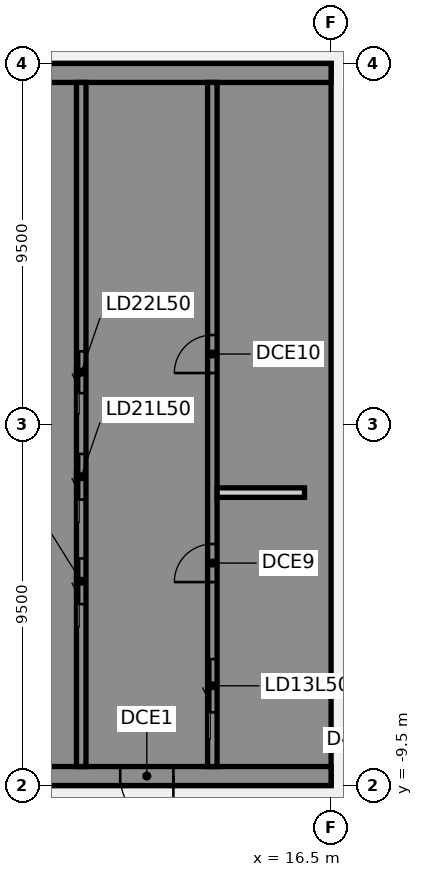
"""IFC4 building model, lengths in metres.
Left out: names, types, materials, properties, quantities, classifications, styles, units other than length and angle.
Written with IfcOpenShell. Run it as: python <this file> out.ifc"""

import sys

from ifc_helpers import new_model, si_unit, direction, frame, frame_2d, origin, place, context, subcontext, project, spatial, polyline, rectangle, outline, extrude, element, fill, save


model = new_model("IFC4")
c1 = context("Model", 3, precision=1e-05, world=origin(), true_north=direction((0.0, 1.0)))
c2 = subcontext(c1, "Body", "Model", "MODEL_VIEW")
j1 = project(units=[si_unit("LENGTHUNIT", "METRE"), si_unit("PLANEANGLEUNIT", "RADIAN")], contexts=[c1])
p1 = place(None, origin())
s1 = spatial("IfcSite", under=j1, at=p1, CompositionType="ELEMENT")
p2 = place(p1, origin())
s2 = spatial("IfcBuilding", under=s1, at=p2, CompositionType="ELEMENT")
p3 = place(p2, frame((0.0, 0.0, 200.5)))
s3 = spatial("IfcBuildingStorey", under=s2, at=p3, CompositionType="ELEMENT", Elevation=200.5)
p4 = place(p3, frame((16.5, -9.25, 0.0), z_axis=(0.0, 0.0, 1.0), x_axis=(-1.0, 0.0, 0.0)))
e1 = element("IfcWall", 1, at=p4, inside=s3, PredefinedType="SHEAR", context=c2, shape_type="SweptSolid", body=[
    extrude(rectangle(XDim=13.0, YDim=0.5, at=frame_2d((6.5, 0.0))), origin(), (0.0, 0.0, 1.0), 3.46),
])
p5 = place(p4, frame((4.15, 0.0, 0.0)))
e2 = element("IfcOpeningElement", 2, at=p5, cuts=e1, PredefinedType="OPENING", context=c2, shape_type="SweptSolid", body=[
    extrude(rectangle(XDim=1.4, YDim=2.1, at=frame_2d((0.7, 1.05))), frame((0.0, 0.26, 0.0), z_axis=(0.0, -1.0, 0.0), x_axis=(1.0, 0.0, 0.0)), (0.0, 0.0, 1.0), 0.52),
])
p6 = place(p4, frame((10.125, 0.0, 0.0)))
e3 = element("IfcOpeningElement", 3, at=p6, cuts=e1, PredefinedType="OPENING", context=c2, shape_type="SweptSolid", body=[
    extrude(rectangle(XDim=1.4, YDim=2.1, at=frame_2d((0.7, 1.05))), frame((0.0, 0.26, 0.0), z_axis=(0.0, -1.0, 0.0), x_axis=(1.0, 0.0, 0.0)), (0.0, 0.0, 1.0), 0.52),
])
p7 = place(p3, origin())
e4 = element("IfcWall", 4, at=p7, inside=s3, PredefinedType="SHEAR", context=c2, shape_type="SweptSolid", body=[
    extrude(outline(polyline([(13.5, -8.125), (13.5, -9.0), (16.0, -9.0), (16.5, -9.0), (16.5, 9.0), (16.0, 9.0), (13.5, 9.0), (13.5, 8.125), (16.0, 8.125), (16.0, 5.625), (13.5, 5.625), (13.5, 5.375), (16.0, 5.375), (16.0, -5.375), (13.5, -5.375), (13.5, -5.625), (16.0, -5.625), (16.0, -8.125), (13.5, -8.125)])), origin(), (0.0, 0.0, 1.0), 3.46),
])
p8 = place(p3, frame((16.5, 9.25, 0.0), z_axis=(0.0, 0.0, 1.0), x_axis=(-1.0, 0.0, 0.0)))
e5 = element("IfcWall", 5, at=p8, inside=s3, PredefinedType="SHEAR", context=c2, shape_type="SweptSolid", body=[
    extrude(rectangle(XDim=13.0, YDim=0.5, at=frame_2d((6.5, 0.0))), origin(), (0.0, 0.0, 1.0), 3.46),
])
p9 = place(p3, origin())
e6 = element("IfcWall", 6, at=p9, inside=s3, PredefinedType="SHEAR", context=c2, shape_type="SweptSolid", body=[
    extrude(outline(polyline([(9.8, -5.375), (7.5, -5.375), (7.5, -2.875), (9.8, -2.875), (9.8, -2.625), (7.5, -2.625), (7.5, -0.125), (9.8, -0.125), (9.8, 0.125), (7.5, 0.125), (7.5, 2.625), (9.8, 2.625), (9.8, 2.875), (7.5, 2.875), (7.5, 5.375), (9.8, 5.375), (9.8, 5.625), (7.5, 5.625), (7.5, 8.125), (9.8, 8.125), (9.8, 9.0), (7.5, 9.0), (7.25, 9.0), (7.25, -5.625), (7.5, -5.625), (9.8, -5.625), (9.8, -5.375)])), origin(), (0.0, 0.0, 1.0), 3.46),
])
p10 = place(p3, origin())
e7 = element("IfcWall", 7, at=p10, inside=s3, PredefinedType="SHEAR", context=c2, shape_type="SweptSolid", body=[
    extrude(outline(polyline([(7.5, -8.125), (7.5, -9.0), (9.8, -9.0), (9.8, -8.125), (9.8, -5.625), (9.55, -5.625), (9.55, -8.125), (7.5, -8.125)])), origin(), (0.0, 0.0, 1.0), 3.46),
])
p11 = place(p3, frame((13.375, -9.0, 0.0), z_axis=(0.0, 0.0, 1.0), x_axis=(0.0, 1.0, 0.0)))
e8 = element("IfcWall", 8, at=p11, inside=s3, PredefinedType="SHEAR", context=c2, shape_type="SweptSolid", body=[
    extrude(rectangle(XDim=18.0, YDim=0.25, at=frame_2d((9.0, 0.0))), origin(), (0.0, 0.0, 1.0), 3.46),
])
p12 = place(p11, frame((1.425, 0.0, 0.0)))
e9 = element("IfcOpeningElement", 9, at=p12, cuts=e8, PredefinedType="OPENING", context=c2, shape_type="SweptSolid", body=[
    extrude(rectangle(XDim=1.4, YDim=2.1, at=frame_2d((0.7, 1.05))), frame((0.0, 0.135, 0.0), z_axis=(0.0, -1.0, 0.0), x_axis=(1.0, 0.0, 0.0)), (0.0, 0.0, 1.0), 0.27),
])
p13 = place(p11, frame((4.854, 0.0, 0.0)))
e10 = element("IfcOpeningElement", 10, at=p13, cuts=e8, PredefinedType="OPENING", context=c2, shape_type="SweptSolid", body=[
    extrude(rectangle(XDim=1.0, YDim=2.1, at=frame_2d((0.5, 1.05))), frame((0.0, 0.135, 0.0), z_axis=(0.0, -1.0, 0.0), x_axis=(1.0, 0.0, 0.0)), (0.0, 0.0, 1.0), 0.27),
])
p14 = place(p11, frame((10.354, 0.0, 0.0)))
e11 = element("IfcOpeningElement", 11, at=p14, cuts=e8, PredefinedType="OPENING", context=c2, shape_type="SweptSolid", body=[
    extrude(rectangle(XDim=1.0, YDim=2.1, at=frame_2d((0.5, 1.05))), frame((0.0, 0.135, 0.0), z_axis=(0.0, -1.0, 0.0), x_axis=(1.0, 0.0, 0.0)), (0.0, 0.0, 1.0), 0.27),
])
p15 = place(p3, frame((9.925, -9.0, 0.0), z_axis=(0.0, 0.0, 1.0), x_axis=(0.0, 1.0, 0.0)))
e12 = element("IfcWall", 12, at=p15, inside=s3, PredefinedType="SHEAR", context=c2, shape_type="SweptSolid", body=[
    extrude(rectangle(XDim=18.0, YDim=0.25, at=frame_2d((9.0, 0.0))), origin(), (0.0, 0.0, 1.0), 3.46),
])
p16 = place(p15, frame((4.275, 0.0, 0.0)))
e13 = element("IfcOpeningElement", 13, at=p16, cuts=e12, PredefinedType="OPENING", context=c2, shape_type="SweptSolid", body=[
    extrude(rectangle(XDim=1.2, YDim=2.1, at=frame_2d((0.6, 1.05))), frame((0.0, 0.135, 0.0), z_axis=(0.0, -1.0, 0.0), x_axis=(1.0, 0.0, 0.0)), (0.0, 0.0, 1.0), 0.27),
])
p17 = place(p15, frame((7.025, 0.0, 0.0)))
e14 = element("IfcOpeningElement", 14, at=p17, cuts=e12, PredefinedType="OPENING", context=c2, shape_type="SweptSolid", body=[
    extrude(rectangle(XDim=1.2, YDim=2.1, at=frame_2d((0.6, 1.05))), frame((0.0, 0.135, 0.0), z_axis=(0.0, -1.0, 0.0), x_axis=(1.0, 0.0, 0.0)), (0.0, 0.0, 1.0), 0.27),
])
p18 = place(p15, frame((9.825, 0.0, 0.0)))
e15 = element("IfcOpeningElement", 15, at=p18, cuts=e12, PredefinedType="OPENING", context=c2, shape_type="SweptSolid", body=[
    extrude(rectangle(XDim=1.1, YDim=2.1, at=frame_2d((0.55, 1.05))), frame((0.0, 0.135, 0.0), z_axis=(0.0, -1.0, 0.0), x_axis=(1.0, 0.0, 0.0)), (0.0, 0.0, 1.0), 0.27),
])
p19 = place(p3, frame((15.8, -1.792, 0.0), z_axis=(0.0, 0.0, 1.0), x_axis=(-1.0, 0.0, 0.0)))
e16 = element("IfcWall", 16, at=p19, inside=s3, PredefinedType="PARTITIONING", context=c2, shape_type="SweptSolid", body=[
    extrude(rectangle(XDim=2.3, YDim=0.25, at=frame_2d((1.15, 0.0))), origin(), (0.0, 0.0, 1.0), 3.46),
])
p20 = place(p5, origin())
e17 = element("IfcDoor", 17, at=p20, inside=s3, OperationType="SINGLE_SWING_LEFT", PredefinedType="DOOR", context=c2, shape_type="SweptSolid", body=[
    extrude(rectangle(XDim=1.4, YDim=2.1, at=frame_2d((0.7, 1.05))), frame((0.0, 0.025, 0.0), z_axis=(0.0, -1.0, 0.0), x_axis=(1.0, 0.0, 0.0)), (0.0, 0.0, 1.0), 0.05),
])
fill(e2, e17)
p21 = place(p12, origin())
e18 = element("IfcDoor", 18, at=p21, inside=s3, OperationType="SLIDING_TO_LEFT", PredefinedType="DOOR", context=c2, shape_type="SweptSolid", body=[
    extrude(rectangle(XDim=1.4, YDim=2.1, at=frame_2d((0.7, 1.05))), frame((0.0, 0.025, 0.0), z_axis=(0.0, -1.0, 0.0), x_axis=(1.0, 0.0, 0.0)), (0.0, 0.0, 1.0), 0.05),
])
fill(e9, e18)
p22 = place(p16, origin())
e19 = element("IfcDoor", 19, at=p22, inside=s3, OperationType="SLIDING_TO_LEFT", PredefinedType="DOOR", context=c2, shape_type="SweptSolid", body=[
    extrude(rectangle(XDim=1.2, YDim=2.1, at=frame_2d((0.6, 1.05))), frame((0.0, 0.025, 0.0), z_axis=(0.0, -1.0, 0.0), x_axis=(1.0, 0.0, 0.0)), (0.0, 0.0, 1.0), 0.05),
])
fill(e13, e19)
p23 = place(p17, origin())
e20 = element("IfcDoor", 20, at=p23, inside=s3, OperationType="SLIDING_TO_LEFT", PredefinedType="DOOR", context=c2, shape_type="SweptSolid", body=[
    extrude(rectangle(XDim=1.2, YDim=2.1, at=frame_2d((0.6, 1.05))), frame((0.0, 0.025, 0.0), z_axis=(0.0, -1.0, 0.0), x_axis=(1.0, 0.0, 0.0)), (0.0, 0.0, 1.0), 0.05),
])
fill(e14, e20)
p24 = place(p18, origin())
e21 = element("IfcDoor", 21, at=p24, inside=s3, OperationType="SLIDING_TO_LEFT", PredefinedType="DOOR", context=c2, shape_type="SweptSolid", body=[
    extrude(rectangle(XDim=1.1, YDim=2.1, at=frame_2d((0.55, 1.05))), frame((0.0, 0.025, 0.0), z_axis=(0.0, -1.0, 0.0), x_axis=(1.0, 0.0, 0.0)), (0.0, 0.0, 1.0), 0.05),
])
fill(e15, e21)
p25 = place(p13, origin())
e22 = element("IfcDoor", 22, at=p25, inside=s3, OperationType="SINGLE_SWING_LEFT", PredefinedType="DOOR", context=c2, shape_type="SweptSolid", body=[
    extrude(rectangle(XDim=1.0, YDim=2.1, at=frame_2d((0.5, 1.05))), frame((0.0, 0.025, 0.0), z_axis=(0.0, -1.0, 0.0), x_axis=(1.0, 0.0, 0.0)), (0.0, 0.0, 1.0), 0.05),
])
fill(e10, e22)
p26 = place(p14, origin())
e23 = element("IfcDoor", 23, at=p26, inside=s3, OperationType="SINGLE_SWING_LEFT", PredefinedType="DOOR", context=c2, shape_type="SweptSolid", body=[
    extrude(rectangle(XDim=1.0, YDim=2.1, at=frame_2d((0.5, 1.05))), frame((0.0, 0.025, 0.0), z_axis=(0.0, -1.0, 0.0), x_axis=(1.0, 0.0, 0.0)), (0.0, 0.0, 1.0), 0.05),
])
fill(e11, e23)
save(model, sys.argv[1])
